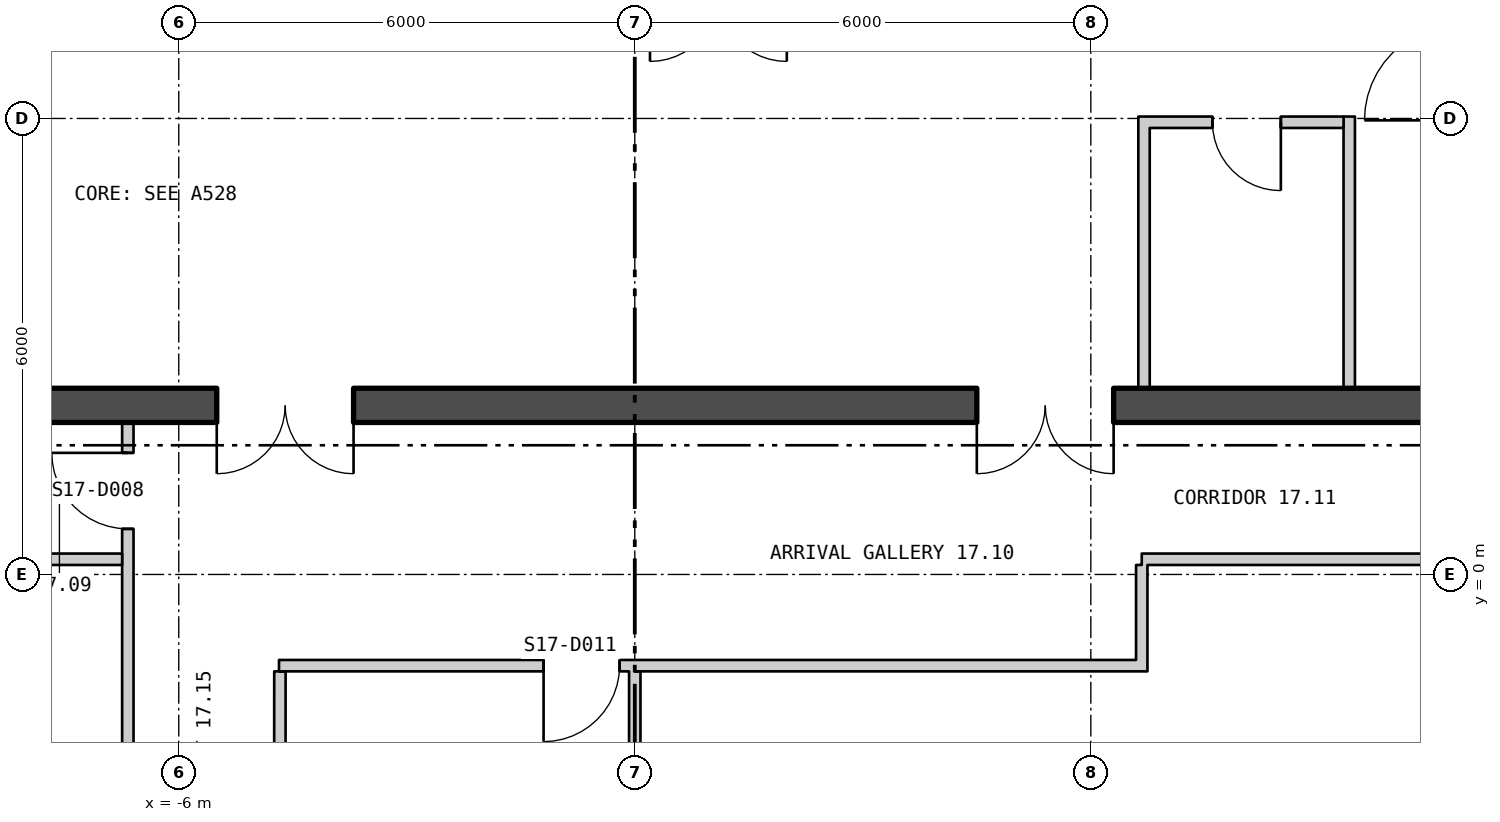
"""IFC4 building model, lengths in metres.
Left out: names, types, materials, properties, quantities, classifications, styles, units other than length and angle.
Written with IfcOpenShell. Run it as: python <this file> out.ifc"""

import sys

from ifc_helpers import new_model, si_unit, direction, frame, frame_2d, origin, place, context, subcontext, project, spatial, polyline, rectangle, outline, extrude, element, fill, save


model = new_model("IFC4")
c1 = context("Model", 3, precision=1e-05, world=origin(), true_north=direction((0.0, 1.0)))
c2 = subcontext(c1, "Body", "Model", "MODEL_VIEW")
j1 = project(units=[si_unit("LENGTHUNIT", "METRE"), si_unit("PLANEANGLEUNIT", "RADIAN")], contexts=[c1])
p1 = place(None, origin())
s1 = spatial("IfcSite", under=j1, at=p1, CompositionType="ELEMENT")
p2 = place(p1, origin())
s2 = spatial("IfcBuilding", under=s1, at=p2, CompositionType="ELEMENT")
p3 = place(p2, frame((0.0, 0.0, 227.7)))
s3 = spatial("IfcBuildingStorey", under=s2, at=p3, CompositionType="ELEMENT", Elevation=227.7)
p4 = place(p3, frame((-26.075, 14.415, -0.18), z_axis=(0.0, 0.0, 1.0), x_axis=(0.499999194392, -0.866025868902, 0.0)))
e1 = element("IfcWall", 1, at=p4, inside=s3, PredefinedType="SOLIDWALL", context=c2, shape_type="SweptSolid", body=[
    extrude(outline(polyline([(-0.13, -0.225), (45.86, -0.225), (45.6, 0.225), (0.13, 0.225), (-0.13, -0.225)])), origin(), (0.0, 0.0, 1.0), 3.68),
])
p5 = place(p4, frame((1.424, 0.0, 1.08)))
e2 = element("IfcOpeningElement", 2, at=p5, cuts=e1, PredefinedType="OPENING", context=c2, shape_type="SweptSolid", body=[
    extrude(rectangle(XDim=2.4, YDim=2.0, at=frame_2d((1.2, 1.0))), frame((0.0, 0.235, 0.0), z_axis=(0.0, -1.0, 0.0), x_axis=(1.0, 0.0, 0.0)), (0.0, 0.0, 1.0), 0.47),
])
p6 = place(p4, frame((5.892, 0.0, 1.08)))
e3 = element("IfcOpeningElement", 3, at=p6, cuts=e1, PredefinedType="OPENING", context=c2, shape_type="SweptSolid", body=[
    extrude(rectangle(XDim=2.4, YDim=2.0, at=frame_2d((1.2, 1.0))), frame((0.0, 0.235, 0.0), z_axis=(0.0, -1.0, 0.0), x_axis=(1.0, 0.0, 0.0)), (0.0, 0.0, 1.0), 0.47),
])
p7 = place(p4, frame((10.399, 0.0, 1.08)))
e4 = element("IfcOpeningElement", 4, at=p7, cuts=e1, PredefinedType="OPENING", context=c2, shape_type="SweptSolid", body=[
    extrude(rectangle(XDim=2.4, YDim=2.0, at=frame_2d((1.2, 1.0))), frame((0.0, 0.235, 0.0), z_axis=(0.0, -1.0, 0.0), x_axis=(1.0, 0.0, 0.0)), (0.0, 0.0, 1.0), 0.47),
])
p8 = place(p4, frame((19.412, 0.0, 1.08)))
e5 = element("IfcOpeningElement", 5, at=p8, cuts=e1, PredefinedType="OPENING", context=c2, shape_type="SweptSolid", body=[
    extrude(rectangle(XDim=2.4, YDim=2.0, at=frame_2d((1.2, 1.0))), frame((0.0, 0.235, 0.0), z_axis=(0.0, -1.0, 0.0), x_axis=(1.0, 0.0, 0.0)), (0.0, 0.0, 1.0), 0.47),
])
p9 = place(p4, frame((23.918, 0.0, 1.08)))
e6 = element("IfcOpeningElement", 6, at=p9, cuts=e1, PredefinedType="OPENING", context=c2, shape_type="SweptSolid", body=[
    extrude(rectangle(XDim=2.4, YDim=2.0, at=frame_2d((1.2, 1.0))), frame((0.0, 0.235, 0.0), z_axis=(0.0, -1.0, 0.0), x_axis=(1.0, 0.0, 0.0)), (0.0, 0.0, 1.0), 0.47),
])
p10 = place(p4, frame((28.425, 0.0, 1.08)))
e7 = element("IfcOpeningElement", 7, at=p10, cuts=e1, PredefinedType="OPENING", context=c2, shape_type="SweptSolid", body=[
    extrude(rectangle(XDim=2.4, YDim=2.0, at=frame_2d((1.2, 1.0))), frame((0.0, 0.235, 0.0), z_axis=(0.0, -1.0, 0.0), x_axis=(1.0, 0.0, 0.0)), (0.0, 0.0, 1.0), 0.47),
])
p11 = place(p4, frame((32.932, 0.0, 1.08)))
e8 = element("IfcOpeningElement", 8, at=p11, cuts=e1, PredefinedType="OPENING", context=c2, shape_type="SweptSolid", body=[
    extrude(rectangle(XDim=2.4, YDim=2.0, at=frame_2d((1.2, 1.0))), frame((0.0, 0.235, 0.0), z_axis=(0.0, -1.0, 0.0), x_axis=(1.0, 0.0, 0.0)), (0.0, 0.0, 1.0), 0.47),
])
p12 = place(p4, frame((41.907, 0.0, 1.08)))
e9 = element("IfcOpeningElement", 9, at=p12, cuts=e1, PredefinedType="OPENING", context=c2, shape_type="SweptSolid", body=[
    extrude(rectangle(XDim=2.4, YDim=2.0, at=frame_2d((1.2, 1.0))), frame((0.0, 0.235, 0.0), z_axis=(0.0, -1.0, 0.0), x_axis=(1.0, 0.0, 0.0)), (0.0, 0.0, 1.0), 0.47),
])
p13 = place(p3, frame((3.21, -25.189, -0.18), z_axis=(0.0, 0.0, 1.0), x_axis=(0.499999194392, 0.866025868902, 0.0)))
e10 = element("IfcWall", 10, at=p13, inside=s3, PredefinedType="SOLIDWALL", context=c2, shape_type="SweptSolid", body=[
    extrude(outline(polyline([(-0.13, -0.225), (45.86, -0.225), (45.6, 0.225), (0.13, 0.225), (-0.13, -0.225)])), origin(), (0.0, 0.0, 1.0), 3.68),
])
p14 = place(p13, frame((1.424, 0.0, 1.08)))
e11 = element("IfcOpeningElement", 11, at=p14, cuts=e10, PredefinedType="OPENING", context=c2, shape_type="SweptSolid", body=[
    extrude(rectangle(XDim=2.4, YDim=2.0, at=frame_2d((1.2, 1.0))), frame((0.0, 0.235, 0.0), z_axis=(0.0, -1.0, 0.0), x_axis=(1.0, 0.0, 0.0)), (0.0, 0.0, 1.0), 0.47),
])
p15 = place(p13, frame((5.892, 0.0, 1.08)))
e12 = element("IfcOpeningElement", 12, at=p15, cuts=e10, PredefinedType="OPENING", context=c2, shape_type="SweptSolid", body=[
    extrude(rectangle(XDim=2.4, YDim=2.0, at=frame_2d((1.2, 1.0))), frame((0.0, 0.235, 0.0), z_axis=(0.0, -1.0, 0.0), x_axis=(1.0, 0.0, 0.0)), (0.0, 0.0, 1.0), 0.47),
])
p16 = place(p13, frame((10.399, 0.0, 1.08)))
e13 = element("IfcOpeningElement", 13, at=p16, cuts=e10, PredefinedType="OPENING", context=c2, shape_type="SweptSolid", body=[
    extrude(rectangle(XDim=2.4, YDim=2.0, at=frame_2d((1.2, 1.0))), frame((0.0, 0.235, 0.0), z_axis=(0.0, -1.0, 0.0), x_axis=(1.0, 0.0, 0.0)), (0.0, 0.0, 1.0), 0.47),
])
p17 = place(p13, frame((14.905, 0.0, 1.08)))
e14 = element("IfcOpeningElement", 14, at=p17, cuts=e10, PredefinedType="OPENING", context=c2, shape_type="SweptSolid", body=[
    extrude(rectangle(XDim=2.4, YDim=2.0, at=frame_2d((1.2, 1.0))), frame((0.0, 0.235, 0.0), z_axis=(0.0, -1.0, 0.0), x_axis=(1.0, 0.0, 0.0)), (0.0, 0.0, 1.0), 0.47),
])
p18 = place(p13, frame((19.412, 0.0, 1.08)))
e15 = element("IfcOpeningElement", 15, at=p18, cuts=e10, PredefinedType="OPENING", context=c2, shape_type="SweptSolid", body=[
    extrude(rectangle(XDim=2.4, YDim=2.0, at=frame_2d((1.2, 1.0))), frame((0.0, 0.235, 0.0), z_axis=(0.0, -1.0, 0.0), x_axis=(1.0, 0.0, 0.0)), (0.0, 0.0, 1.0), 0.47),
])
p19 = place(p13, frame((23.918, 0.0, 1.08)))
e16 = element("IfcOpeningElement", 16, at=p19, cuts=e10, PredefinedType="OPENING", context=c2, shape_type="SweptSolid", body=[
    extrude(rectangle(XDim=2.4, YDim=2.0, at=frame_2d((1.2, 1.0))), frame((0.0, 0.235, 0.0), z_axis=(0.0, -1.0, 0.0), x_axis=(1.0, 0.0, 0.0)), (0.0, 0.0, 1.0), 0.47),
])
p20 = place(p13, frame((32.932, 0.0, 1.08)))
e17 = element("IfcOpeningElement", 17, at=p20, cuts=e10, PredefinedType="OPENING", context=c2, shape_type="SweptSolid", body=[
    extrude(rectangle(XDim=2.4, YDim=2.0, at=frame_2d((1.2, 1.0))), frame((0.0, 0.235, 0.0), z_axis=(0.0, -1.0, 0.0), x_axis=(1.0, 0.0, 0.0)), (0.0, 0.0, 1.0), 0.47),
])
p21 = place(p13, frame((37.438, 0.0, 1.08)))
e18 = element("IfcOpeningElement", 18, at=p21, cuts=e10, PredefinedType="OPENING", context=c2, shape_type="SweptSolid", body=[
    extrude(rectangle(XDim=2.4, YDim=2.0, at=frame_2d((1.2, 1.0))), frame((0.0, 0.235, 0.0), z_axis=(0.0, -1.0, 0.0), x_axis=(1.0, 0.0, 0.0)), (0.0, 0.0, 1.0), 0.47),
])
p22 = place(p13, frame((41.907, 0.0, 1.08)))
e19 = element("IfcOpeningElement", 19, at=p22, cuts=e10, PredefinedType="OPENING", context=c2, shape_type="SweptSolid", body=[
    extrude(rectangle(XDim=2.4, YDim=2.0, at=frame_2d((1.2, 1.0))), frame((0.0, 0.235, 0.0), z_axis=(0.0, -1.0, 0.0), x_axis=(1.0, 0.0, 0.0)), (0.0, 0.0, 1.0), 0.47),
])
p23 = place(p3, frame((-16.2, 2.225, 0.0), z_axis=(0.0, 0.0, 1.0), x_axis=(1.0, 0.0, 0.0)))
e20 = element("IfcWall", 20, at=p23, inside=s3, PredefinedType="SHEAR", context=c2, shape_type="SweptSolid", body=[
    extrude(rectangle(XDim=32.4, YDim=0.45, at=frame_2d((16.2, 0.0))), origin(), (0.0, 0.0, 1.0), 3.7),
])
p24 = place(p23, frame((10.7, 0.0, 0.0)))
e21 = element("IfcOpeningElement", 21, at=p24, cuts=e20, PredefinedType="OPENING", context=c2, shape_type="SweptSolid", body=[
    extrude(rectangle(XDim=1.8, YDim=2.4, at=frame_2d((0.9, 1.2))), frame((0.0, 0.235, 0.0), z_axis=(0.0, -1.0, 0.0), x_axis=(1.0, 0.0, 0.0)), (0.0, 0.0, 1.0), 0.47),
])
p25 = place(p23, frame((20.7, 0.0, 0.0)))
e22 = element("IfcOpeningElement", 22, at=p25, cuts=e20, PredefinedType="OPENING", context=c2, shape_type="SweptSolid", body=[
    extrude(rectangle(XDim=1.8, YDim=2.4, at=frame_2d((0.9, 1.2))), frame((0.0, 0.235, 0.0), z_axis=(0.0, -1.0, 0.0), x_axis=(1.0, 0.0, 0.0)), (0.0, 0.0, 1.0), 0.47),
])
for number, where, z_axis, x_axis in (
    (23, (6.7, 2.45, 0.0), (0.0, 0.0, 1.0), (0.0, 1.0, 0.0)),
    (24, (9.4, 2.45, 0.0), (0.0, 0.0, 1.0), (0.0, 1.0, 0.0)),
):
    element("IfcWall", number, at=place(p3, frame(where, z_axis=z_axis, x_axis=x_axis)), inside=s3, PredefinedType="PARTITIONING", context=c2, shape_type="SweptSolid", body=[
        extrude(rectangle(XDim=3.575, YDim=0.15, at=frame_2d((1.788, 0.0))), origin(), (0.0, 0.0, 1.0), 3.7),
    ])
p26 = place(p3, frame((6.775, 5.95, 0.0), z_axis=(0.0, 0.0, 1.0), x_axis=(1.0, 0.0, 0.0)))
e25 = element("IfcWall", 25, at=p26, inside=s3, PredefinedType="PARTITIONING", context=c2, shape_type="SweptSolid", body=[
    extrude(rectangle(XDim=2.55, YDim=0.15, at=frame_2d((1.275, 0.0))), origin(), (0.0, 0.0, 1.0), 3.7),
])
p27 = place(p26, frame((0.825, 0.0, 0.0)))
e26 = element("IfcOpeningElement", 26, at=p27, cuts=e25, PredefinedType="OPENING", context=c2, shape_type="SweptSolid", body=[
    extrude(rectangle(XDim=0.9, YDim=2.1, at=frame_2d((0.45, 1.05))), frame((0.0, 0.085, 0.0), z_axis=(0.0, -1.0, 0.0), x_axis=(1.0, 0.0, 0.0)), (0.0, 0.0, 1.0), 0.17),
])
p28 = place(p3, frame((-17.608, 0.2, 0.0), z_axis=(0.0, 0.0, 1.0), x_axis=(1.0, 0.0, 0.0)))
e27 = element("IfcWall", 27, at=p28, inside=s3, PredefinedType="PARTITIONING", context=c2, shape_type="SweptSolid", body=[
    extrude(rectangle(XDim=10.863, YDim=0.15, at=frame_2d((5.431, 0.0))), origin(), (0.0, 0.0, 1.0), 3.7),
])
p29 = place(p3, frame((-6.67, -3.412, 0.0), z_axis=(0.0, 0.0, 1.0), x_axis=(0.0, 1.0, 0.0)))
e28 = element("IfcWall", 28, at=p29, inside=s3, PredefinedType="PARTITIONING", context=c2, shape_type="SweptSolid", body=[
    extrude(rectangle(XDim=5.412, YDim=0.15, at=frame_2d((2.706, 0.0))), origin(), (0.0, 0.0, 1.0), 3.7),
])
p30 = place(p29, frame((4.012, 0.0, 0.0)))
e29 = element("IfcOpeningElement", 29, at=p30, cuts=e28, PredefinedType="OPENING", context=c2, shape_type="SweptSolid", body=[
    extrude(rectangle(XDim=1.0, YDim=2.1, at=frame_2d((0.5, 1.05))), frame((0.0, 0.085, 0.0), z_axis=(0.0, -1.0, 0.0), x_axis=(1.0, 0.0, 0.0)), (0.0, 0.0, 1.0), 0.17),
])
p31 = place(p3, frame((-4.681, -1.2, 0.0), z_axis=(0.0, 0.0, 1.0), x_axis=(1.0, 0.0, 0.0)))
e30 = element("IfcWall", 30, at=p31, inside=s3, PredefinedType="PARTITIONING", context=c2, shape_type="SweptSolid", body=[
    extrude(rectangle(XDim=11.426, YDim=0.15, at=frame_2d((5.713, 0.0))), origin(), (0.0, 0.0, 1.0), 3.7),
])
p32 = place(p31, frame((3.481, 0.0, 0.0)))
e31 = element("IfcOpeningElement", 31, at=p32, cuts=e30, PredefinedType="OPENING", context=c2, shape_type="SweptSolid", body=[
    extrude(rectangle(XDim=1.0, YDim=2.1, at=frame_2d((0.5, 1.05))), frame((0.0, 0.085, 0.0), z_axis=(0.0, -1.0, 0.0), x_axis=(1.0, 0.0, 0.0)), (0.0, 0.0, 1.0), 0.17),
])
p33 = place(p3, frame((-4.67, -3.48, 0.0), z_axis=(0.0, 0.0, 1.0), x_axis=(0.000453514693, 0.999999897162, 0.0)))
e32 = element("IfcWall", 32, at=p33, inside=s3, PredefinedType="PARTITIONING", context=c2, shape_type="SweptSolid", body=[
    extrude(rectangle(XDim=2.205, YDim=0.15, at=frame_2d((1.103, 0.0))), origin(), (0.0, 0.0, 1.0), 3.7),
])
p34 = place(p3, frame((-0.001, -3.1, 0.0), z_axis=(0.0, 0.0, 1.0), x_axis=(0.000438356122, 0.999999903922, 0.0)))
e33 = element("IfcWall", 33, at=p34, inside=s3, PredefinedType="PARTITIONING", context=c2, shape_type="SweptSolid", body=[
    extrude(rectangle(XDim=1.825, YDim=0.15, at=frame_2d((0.912, 0.0))), origin(), (0.0, 0.0, 1.0), 3.15),
])
p35 = place(p3, frame((6.67, -1.125, 0.0), z_axis=(0.0, 0.0, 1.0), x_axis=(0.0, 1.0, 0.0)))
e34 = element("IfcWall", 34, at=p35, inside=s3, PredefinedType="PARTITIONING", context=c2, shape_type="SweptSolid", body=[
    extrude(rectangle(XDim=1.25, YDim=0.15, at=frame_2d((0.625, 0.0))), origin(), (0.0, 0.0, 1.0), 3.7),
])
p36 = place(p3, frame((6.67, 0.2, 0.0), z_axis=(0.0, 0.0, 1.0), x_axis=(1.0, 0.0, 0.0)))
e35 = element("IfcWall", 35, at=p36, inside=s3, PredefinedType="PARTITIONING", context=c2, shape_type="SweptSolid", body=[
    extrude(rectangle(XDim=10.938, YDim=0.15, at=frame_2d((5.469, 0.0))), origin(), (0.0, 0.0, 1.0), 3.7),
])
p37 = place(p36, frame((3.721, 0.0, 0.0)))
e36 = element("IfcOpeningElement", 36, at=p37, cuts=e35, PredefinedType="OPENING", context=c2, shape_type="SweptSolid", body=[
    extrude(rectangle(XDim=1.8, YDim=2.1, at=frame_2d((0.9, 1.05))), frame((0.0, 0.085, 0.0), z_axis=(0.0, -1.0, 0.0), x_axis=(1.0, 0.0, 0.0)), (0.0, 0.0, 1.0), 0.17),
])
p38 = place(p27, origin())
e37 = element("IfcDoor", 37, at=p38, inside=s3, OperationType="SINGLE_SWING_RIGHT", PredefinedType="DOOR", context=c2, shape_type="SweptSolid", body=[
    extrude(rectangle(XDim=0.9, YDim=2.1, at=frame_2d((0.45, 1.05))), frame((0.0, 0.025, 0.0), z_axis=(0.0, -1.0, 0.0), x_axis=(1.0, 0.0, 0.0)), (0.0, 0.0, 1.0), 0.05),
])
fill(e26, e37)
p39 = place(p24, origin())
e38 = element("IfcDoor", 38, at=p39, inside=s3, OperationType="DOUBLE_DOOR_SINGLE_SWING", PredefinedType="DOOR", context=c2, shape_type="SweptSolid", body=[
    extrude(rectangle(XDim=1.8, YDim=2.4, at=frame_2d((0.9, 1.2))), frame((0.0, 0.025, 0.0), z_axis=(0.0, -1.0, 0.0), x_axis=(1.0, 0.0, 0.0)), (0.0, 0.0, 1.0), 0.05),
])
fill(e21, e38)
p40 = place(p25, origin())
e39 = element("IfcDoor", 39, at=p40, inside=s3, OperationType="DOUBLE_DOOR_SINGLE_SWING", PredefinedType="DOOR", context=c2, shape_type="SweptSolid", body=[
    extrude(rectangle(XDim=1.8, YDim=2.4, at=frame_2d((0.9, 1.2))), frame((0.0, 0.025, 0.0), z_axis=(0.0, -1.0, 0.0), x_axis=(1.0, 0.0, 0.0)), (0.0, 0.0, 1.0), 0.05),
])
fill(e22, e39)
p41 = place(p30, origin())
e40 = element("IfcDoor", 40, at=p41, inside=s3, OperationType="SINGLE_SWING_LEFT", PredefinedType="DOOR", context=c2, shape_type="SweptSolid", body=[
    extrude(rectangle(XDim=1.0, YDim=2.1, at=frame_2d((0.5, 1.05))), frame((0.0, 0.025, 0.0), z_axis=(0.0, -1.0, 0.0), x_axis=(1.0, 0.0, 0.0)), (0.0, 0.0, 1.0), 0.05),
])
fill(e29, e40)
p42 = place(p32, origin())
e41 = element("IfcDoor", 41, at=p42, inside=s3, OperationType="SINGLE_SWING_LEFT", PredefinedType="DOOR", context=c2, shape_type="SweptSolid", body=[
    extrude(rectangle(XDim=1.0, YDim=2.1, at=frame_2d((0.5, 1.05))), frame((0.0, 0.025, 0.0), z_axis=(0.0, -1.0, 0.0), x_axis=(1.0, 0.0, 0.0)), (0.0, 0.0, 1.0), 0.05),
])
fill(e31, e41)
save(model, sys.argv[1])
